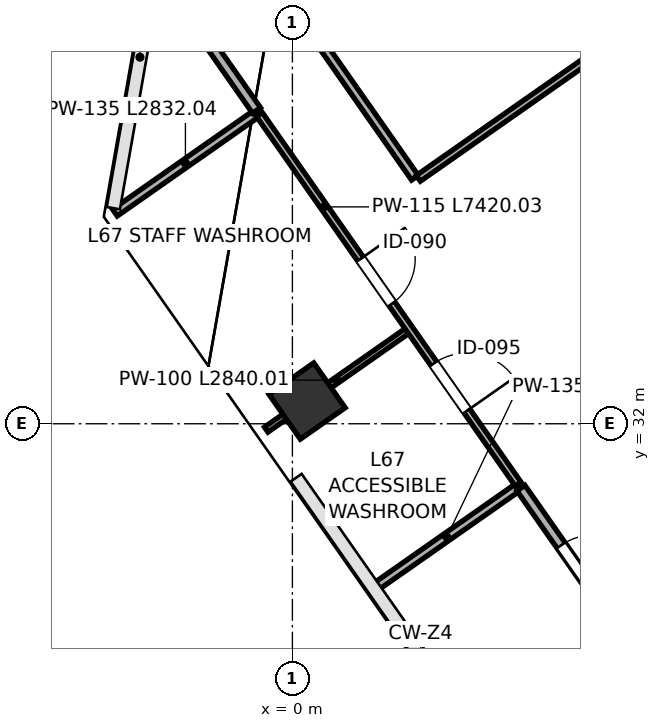
"""IFC4 building model, lengths in metres.
Left out: names, types, materials, properties, quantities, classifications, styles, units other than length and angle.
Written with IfcOpenShell. Run it as: python <this file> out.ifc"""

import sys

from ifc_helpers import new_model, si_unit, direction, frame, frame_2d, origin, origin_2d, place, context, subcontext, project, spatial, rectangle, extrude, source, transform, mapped, element, fill, save


model = new_model("IFC4")
c1 = context("Model", 3, precision=1e-05, world=origin(), true_north=direction((0.0, 1.0)))
c2 = subcontext(c1, "Body", "Model", "MODEL_VIEW")
j1 = project(units=[si_unit("LENGTHUNIT", "METRE"), si_unit("PLANEANGLEUNIT", "RADIAN")], contexts=[c1])
p1 = place(None, origin())
s1 = spatial("IfcSite", under=j1, at=p1, CompositionType="ELEMENT")
p2 = place(p1, origin())
s2 = spatial("IfcBuilding", under=s1, at=p2, CompositionType="ELEMENT")
p3 = place(p2, frame((0.0, 0.0, 298.8)))
s3 = spatial("IfcBuildingStorey", under=s2, at=p3, CompositionType="ELEMENT", Elevation=298.8)
m1 = source(origin(), c2, "Body", "SweptSolid", [
    extrude(rectangle(XDim=0.9, YDim=0.9, at=origin_2d()), origin(), (0.0, 0.0, 1.0), 4.198),
])
p4 = place(p3, frame((0.241, 32.374, 0.001), z_axis=(0.0, 0.0, 1.0), x_axis=(-0.573576436351, 0.819152044289, 0.0)))
e1 = element("IfcColumn", 1, at=p4, inside=s3, PredefinedType="COLUMN", context=c2, shape_type="MappedRepresentation", body=[
    mapped(m1, transform((0.0, 0.0, 0.0), scale=1.0)),
])
p5 = place(p3, frame((-2.919, 35.471, 0.0), z_axis=(0.0, 0.0, 1.0), x_axis=(0.819098241059, 0.573653267657, 0.0)))
e2 = element("IfcWall", 2, at=p5, inside=s3, PredefinedType="PARTITIONING", context=c2, shape_type="SweptSolid", body=[
    extrude(rectangle(XDim=2.832, YDim=0.135, at=frame_2d((1.416, 0.0))), origin(), (0.0, 0.0, 1.0), 3.96),
])
p6 = place(p3, frame((-2.214, 39.471, 0.0), z_axis=(0.0, 0.0, 1.0), x_axis=(0.573653267657, -0.819098241059, 0.0)))
e3 = element("IfcWall", 3, at=p6, inside=s3, PredefinedType="PARTITIONING", context=c2, shape_type="SweptSolid", body=[
    extrude(rectangle(XDim=2.832, YDim=0.16, at=frame_2d((1.416, 0.0))), origin(), (0.0, 0.0, 1.0), 3.96),
])
p7 = place(p3, frame((-0.431, 31.904, 0.0), z_axis=(0.0, 0.0, 1.0), x_axis=(0.819122867865, 0.573618102347, 0.0)))
e4 = element("IfcWall", 4, at=p7, inside=s3, PredefinedType="PARTITIONING", context=c2, shape_type="SweptSolid", body=[
    extrude(rectangle(XDim=2.84, YDim=0.1, at=frame_2d((1.42, 0.0))), origin(), (0.0, 0.0, 1.0), 3.295),
])
p8 = place(p3, frame((1.376, 29.323, 0.0), z_axis=(0.0, 0.0, 1.0), x_axis=(0.819163257805, 0.573560421458, 0.0)))
e5 = element("IfcWall", 5, at=p8, inside=s3, PredefinedType="PARTITIONING", context=c2, shape_type="SweptSolid", body=[
    extrude(rectangle(XDim=2.84, YDim=0.135, at=frame_2d((1.42, 0.0))), origin(), (0.0, 0.0, 1.0), 3.295),
])
p9 = place(p3, frame((-0.544, 37.086, 0.0), z_axis=(0.0, 0.0, 1.0), x_axis=(0.573568336404, -0.819157715873, 0.0)))
e6 = element("IfcWall", 6, at=p9, inside=s3, PredefinedType="PARTITIONING", context=c2, shape_type="SweptSolid", body=[
    extrude(rectangle(XDim=7.42, YDim=0.115, at=frame_2d((3.71, 0.0))), origin(), (0.0, 0.0, 1.0), 3.96),
])
p10 = place(p9, frame((2.9, 0.0, 0.0)))
e7 = element("IfcOpeningElement", 7, at=p10, cuts=e6, PredefinedType="OPENING", context=c2, shape_type="SweptSolid", body=[
    extrude(rectangle(XDim=0.9, YDim=2.15, at=frame_2d((0.45, 1.075))), frame((0.0, 0.067, 0.0), z_axis=(0.0, -1.0, 0.0), x_axis=(1.0, 0.0, 0.0)), (0.0, 0.0, 1.0), 0.135),
])
p11 = place(p9, frame((5.0, 0.0, 0.0)))
e8 = element("IfcOpeningElement", 8, at=p11, cuts=e6, PredefinedType="OPENING", context=c2, shape_type="SweptSolid", body=[
    extrude(rectangle(XDim=0.95, YDim=2.15, at=frame_2d((0.475, 1.075))), frame((0.0, 0.067, 0.0), z_axis=(0.0, -1.0, 0.0), x_axis=(1.0, 0.0, 0.0)), (0.0, 0.0, 1.0), 0.135),
])
p12 = place(p3, frame((3.758, 30.942, 0.0), z_axis=(0.0, 0.0, 1.0), x_axis=(0.573575634469, -0.819152605772, 0.0)))
e9 = element("IfcWall", 9, at=p12, inside=s3, PredefinedType="PARTITIONING", context=c2, shape_type="SweptSolid", body=[
    extrude(rectangle(XDim=11.57, YDim=0.16, at=frame_2d((5.785, 0.0))), origin(), (0.0, 0.0, 1.0), 3.96),
])
p13 = place(p12, frame((1.15, 0.0, 0.0)))
e10 = element("IfcOpeningElement", 10, at=p13, cuts=e9, PredefinedType="OPENING", context=c2, shape_type="SweptSolid", body=[
    extrude(rectangle(XDim=0.95, YDim=2.15, at=frame_2d((0.475, 1.075))), frame((0.0, 0.09, 0.0), z_axis=(0.0, -1.0, 0.0), x_axis=(1.0, 0.0, 0.0)), (0.0, 0.0, 1.0), 0.18),
])
p14 = place(p3, frame((-1.443, 40.985, 0.0), z_axis=(0.0, 0.0, 1.0), x_axis=(0.573587332855, -0.819144414367, 0.0)))
e11 = element("IfcWall", 11, at=p14, inside=s3, PredefinedType="PARTITIONING", context=c2, shape_type="SweptSolid", body=[
    extrude(rectangle(XDim=6.03, YDim=0.135, at=frame_2d((3.015, 0.0))), origin(), (0.0, 0.0, 1.0), 3.96),
])
p15 = place(p3, frame((2.071, 36.036, 0.0), z_axis=(0.0, 0.0, 1.0), x_axis=(0.819154854942, 0.573572422302, 0.0)))
e12 = element("IfcWall", 12, at=p15, inside=s3, PredefinedType="PARTITIONING", context=c2, shape_type="SweptSolid", body=[
    extrude(rectangle(XDim=29.62, YDim=0.115, at=frame_2d((14.81, 0.0))), origin(), (0.0, 0.0, 1.0), 3.96),
])
p16 = place(p15, frame((4.2, 0.0, 0.0)))
e13 = element("IfcOpeningElement", 13, at=p16, cuts=e12, PredefinedType="OPENING", context=c2, shape_type="SweptSolid", body=[
    extrude(rectangle(XDim=0.95, YDim=2.15, at=frame_2d((0.475, 1.075))), frame((0.0, 0.067, 0.0), z_axis=(0.0, -1.0, 0.0), x_axis=(1.0, 0.0, 0.0)), (0.0, 0.0, 1.0), 0.135),
])
m2 = source(origin(), c2, "Body", "SweptSolid", [
    extrude(rectangle(XDim=0.9, YDim=2.15, at=frame_2d((0.45, 1.075))), frame((0.0, 0.025, 0.0), z_axis=(0.0, -1.0, 0.0), x_axis=(1.0, 0.0, 0.0)), (0.0, 0.0, 1.0), 0.05),
])
p17 = place(p10, origin())
e14 = element("IfcDoor", 14, at=p17, inside=s3, OperationType="SINGLE_SWING_LEFT", PredefinedType="DOOR", context=c2, shape_type="MappedRepresentation", body=[
    mapped(m2, transform((0.0, 0.0, 0.0), scale=1.0)),
])
fill(e7, e14)
m3 = source(origin(), c2, "Body", "SweptSolid", [
    extrude(rectangle(XDim=0.95, YDim=2.15, at=frame_2d((0.475, 1.075))), frame((0.0, 0.025, 0.0), z_axis=(0.0, -1.0, 0.0), x_axis=(1.0, 0.0, 0.0)), (0.0, 0.0, 1.0), 0.05),
])
p18 = place(p11, origin())
e15 = element("IfcDoor", 15, at=p18, inside=s3, OperationType="SINGLE_SWING_RIGHT", PredefinedType="DOOR", context=c2, shape_type="MappedRepresentation", body=[
    mapped(m3, transform((0.0, 0.0, 0.0), scale=1.0)),
])
fill(e8, e15)
m4 = source(origin(), c2, "Body", "SweptSolid", [
    extrude(rectangle(XDim=0.95, YDim=2.15, at=frame_2d((0.475, 1.075))), frame((0.0, 0.025, 0.0), z_axis=(0.0, -1.0, 0.0), x_axis=(1.0, 0.0, 0.0)), (0.0, 0.0, 1.0), 0.05),
])
p19 = place(p13, origin())
e16 = element("IfcDoor", 16, at=p19, inside=s3, OperationType="SINGLE_SWING_RIGHT", PredefinedType="DOOR", context=c2, shape_type="MappedRepresentation", body=[
    mapped(m4, transform((0.0, 0.0, 0.0), scale=1.0)),
])
fill(e10, e16)
save(model, sys.argv[1])
